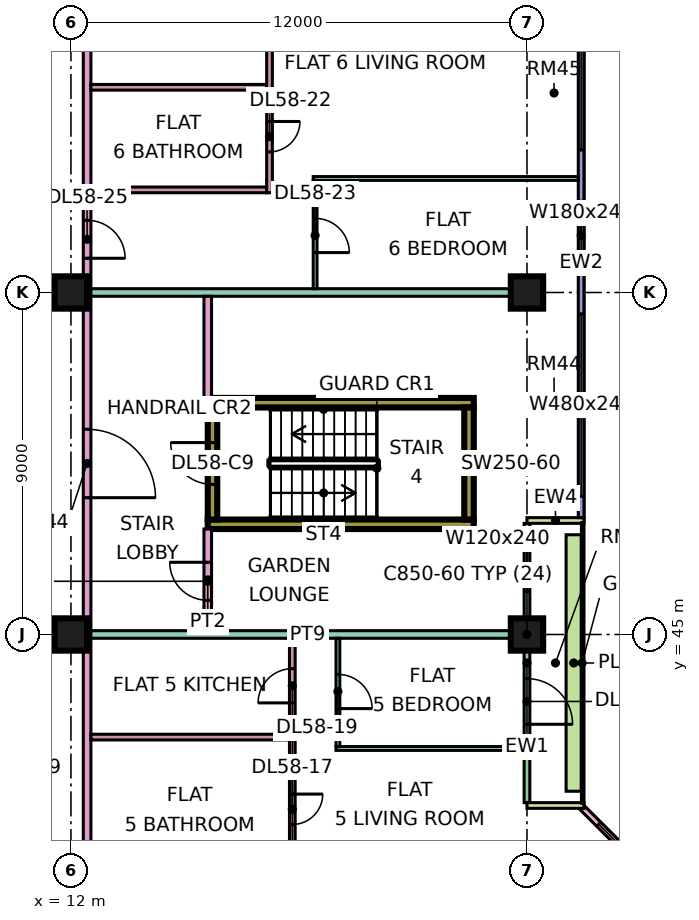
"""IFC4 building model, lengths in metres.
Left out: names, types, materials, properties, quantities, classifications, styles, units other than length and angle.
Written with IfcOpenShell. Run it as: python <this file> out.ifc"""

import sys

from ifc_helpers import new_model, si_unit, direction, frame, frame_2d, origin, origin_2d, place, context, subcontext, project, spatial, rectangle, extrude, element, fill, save


model = new_model("IFC4")
c1 = context("Model", 3, precision=1e-05, world=origin(), true_north=direction((0.0, 1.0)))
c2 = subcontext(c1, "Body", "Model", "MODEL_VIEW")
j1 = project(units=[si_unit("LENGTHUNIT", "METRE"), si_unit("PLANEANGLEUNIT", "RADIAN")], contexts=[c1])
p1 = place(None, origin())
s1 = spatial("IfcSite", under=j1, at=p1, CompositionType="ELEMENT")
p2 = place(p1, origin())
s2 = spatial("IfcBuilding", under=s1, at=p2, CompositionType="ELEMENT")
p3 = place(p2, frame((0.0, 0.0, 245.4)))
s3 = spatial("IfcBuildingStorey", under=s2, at=p3, CompositionType="ELEMENT", Elevation=245.4)
for number, where, z_axis, x_axis in (
    (1, (12.0, 45.0, 0.0), (0.0, 0.0, 1.0), (1.0, 0.0, 0.0)),
    (2, (12.0, 54.0, 0.0), (0.0, 0.0, 1.0), (1.0, 0.0, 0.0)),
    (3, (24.0, 45.0, 0.0), (0.0, 0.0, 1.0), (1.0, 0.0, 0.0)),
    (4, (24.0, 54.0, 0.0), (0.0, 0.0, 1.0), (1.0, 0.0, 0.0)),
):
    element("IfcColumn", number, at=place(p3, frame(where, z_axis=z_axis, x_axis=x_axis)), inside=s3, PredefinedType="COLUMN", context=c2, shape_type="SweptSolid", body=[
        extrude(rectangle(XDim=0.85, YDim=0.85, at=origin_2d()), origin(), (0.0, 0.0, 1.0), 3.75),
    ])
for number, where, z_axis, x_axis in (
    (5, (15.6, 47.9, 0.0), (0.0, 0.0, 1.0), (1.0, 0.0, 0.0)),
    (6, (15.6, 51.1, 0.0), (0.0, 0.0, 1.0), (1.0, 0.0, 0.0)),
):
    element("IfcWall", number, at=place(p3, frame(where, z_axis=z_axis, x_axis=x_axis)), inside=s3, PredefinedType="SHEAR", context=c2, shape_type="SweptSolid", body=[
        extrude(rectangle(XDim=7.0, YDim=0.25, at=frame_2d((3.5, 0.0))), origin(), (0.0, 0.0, 1.0), 3.75),
    ])
p4 = place(p3, frame((15.725, 48.025, 0.0), z_axis=(0.0, 0.0, 1.0), x_axis=(0.0, 1.0, 0.0)))
e7 = element("IfcWall", 7, at=p4, inside=s3, PredefinedType="SHEAR", context=c2, shape_type="SweptSolid", body=[
    extrude(rectangle(XDim=2.95, YDim=0.25, at=frame_2d((1.475, 0.0))), origin(), (0.0, 0.0, 1.0), 3.75),
])
p5 = place(p4, frame((0.925, 0.0, 0.0)))
e8 = element("IfcOpeningElement", 8, at=p5, cuts=e7, PredefinedType="OPENING", context=c2, shape_type="SweptSolid", body=[
    extrude(rectangle(XDim=1.1, YDim=2.2, at=frame_2d((0.55, 1.1))), frame((0.0, 0.135, 0.0), z_axis=(0.0, -1.0, 0.0), x_axis=(1.0, 0.0, 0.0)), (0.0, 0.0, 1.0), 0.27),
])
p6 = place(p3, frame((22.475, 48.025, 0.0), z_axis=(0.0, 0.0, 1.0), x_axis=(0.0, 1.0, 0.0)))
e9 = element("IfcWall", 9, at=p6, inside=s3, PredefinedType="SHEAR", context=c2, shape_type="SweptSolid", body=[
    extrude(rectangle(XDim=2.95, YDim=0.25, at=frame_2d((1.475, 0.0))), origin(), (0.0, 0.0, 1.0), 3.75),
])
p7 = place(p3, frame((28.447, 37.447, 0.0), z_axis=(0.0, 0.0, 1.0), x_axis=(-0.707106781187, 0.707106781187, 0.0)))
e10 = element("IfcWall", 10, at=p7, inside=s3, PredefinedType="SOLIDWALL", context=c2, shape_type="SweptSolid", body=[
    extrude(rectangle(XDim=4.243, YDim=0.15, at=frame_2d((2.121, 0.0))), origin(), (0.0, 0.0, 1.0), 3.35),
])
p8 = place(p7, frame((0.621, 0.0, 0.45)))
e11 = element("IfcOpeningElement", 11, at=p8, cuts=e10, PredefinedType="OPENING", context=c2, shape_type="SweptSolid", body=[
    extrude(rectangle(XDim=3.0, YDim=2.4, at=frame_2d((1.5, 1.2))), frame((0.0, 0.085, 0.0), z_axis=(0.0, -1.0, 0.0), x_axis=(1.0, 0.0, 0.0)), (0.0, 0.0, 1.0), 0.17),
])
p9 = place(p3, frame((24.0, 40.575, 0.0), z_axis=(0.0, 0.0, 1.0), x_axis=(0.0, 1.0, 0.0)))
e12 = element("IfcWall", 12, at=p9, inside=s3, PredefinedType="SOLIDWALL", context=c2, shape_type="SweptSolid", body=[
    extrude(rectangle(XDim=7.35, YDim=0.15, at=frame_2d((3.675, 0.0))), origin(), (0.0, 0.0, 1.0), 3.35),
])
p10 = place(p9, frame((2.062, 0.0, 0.0)))
e13 = element("IfcOpeningElement", 13, at=p10, cuts=e12, PredefinedType="OPENING", context=c2, shape_type="SweptSolid", body=[
    extrude(rectangle(XDim=1.2, YDim=2.4, at=frame_2d((0.6, 1.2))), frame((0.0, 0.085, 0.0), z_axis=(0.0, -1.0, 0.0), x_axis=(1.0, 0.0, 0.0)), (0.0, 0.0, 1.0), 0.17),
])
p11 = place(p9, frame((5.55, 0.0, 0.45)))
e14 = element("IfcOpeningElement", 14, at=p11, cuts=e12, PredefinedType="OPENING", context=c2, shape_type="SweptSolid", body=[
    extrude(rectangle(XDim=1.2, YDim=2.4, at=frame_2d((0.6, 1.2))), frame((0.0, 0.085, 0.0), z_axis=(0.0, -1.0, 0.0), x_axis=(1.0, 0.0, 0.0)), (0.0, 0.0, 1.0), 0.17),
])
for number, where, z_axis, x_axis in (
    (15, (25.5, 40.5, 0.0), (0.0, 0.0, 1.0), (-1.0, 0.0, 0.0)),
    (16, (25.5, 48.0, 0.0), (0.0, 0.0, 1.0), (-1.0, 0.0, 0.0)),
):
    element("IfcWall", number, at=place(p3, frame(where, z_axis=z_axis, x_axis=x_axis)), inside=s3, PredefinedType="SOLIDWALL", context=c2, shape_type="SweptSolid", body=[
        extrude(rectangle(XDim=1.5, YDim=0.15, at=frame_2d((0.75, 0.0))), origin(), (0.0, 0.0, 1.0), 3.35),
    ])
p12 = place(p3, frame((25.425, 48.075, 0.0), z_axis=(0.0, 0.0, 1.0), x_axis=(0.0, 1.0, 0.0)))
e17 = element("IfcWall", 17, at=p12, inside=s3, PredefinedType="SOLIDWALL", context=c2, shape_type="SweptSolid", body=[
    extrude(rectangle(XDim=13.425, YDim=0.15, at=frame_2d((6.712, 0.0))), origin(), (0.0, 0.0, 1.0), 3.35),
])
p13 = place(p12, frame((0.562, 0.0, 0.45)))
e18 = element("IfcOpeningElement", 18, at=p13, cuts=e17, PredefinedType="OPENING", context=c2, shape_type="SweptSolid", body=[
    extrude(rectangle(XDim=4.8, YDim=2.4, at=frame_2d((2.4, 1.2))), frame((0.0, 0.085, 0.0), z_axis=(0.0, -1.0, 0.0), x_axis=(1.0, 0.0, 0.0)), (0.0, 0.0, 1.0), 0.17),
])
p14 = place(p12, frame((6.525, 0.0, 0.45)))
e19 = element("IfcOpeningElement", 19, at=p14, cuts=e17, PredefinedType="OPENING", context=c2, shape_type="SweptSolid", body=[
    extrude(rectangle(XDim=1.8, YDim=2.4, at=frame_2d((0.9, 1.2))), frame((0.0, 0.085, 0.0), z_axis=(0.0, -1.0, 0.0), x_axis=(1.0, 0.0, 0.0)), (0.0, 0.0, 1.0), 0.17),
])
p15 = place(p12, frame((9.675, 0.0, 0.45)))
e20 = element("IfcOpeningElement", 20, at=p15, cuts=e17, PredefinedType="OPENING", context=c2, shape_type="SweptSolid", body=[
    extrude(rectangle(XDim=3.0, YDim=2.4, at=frame_2d((1.5, 1.2))), frame((0.0, 0.085, 0.0), z_axis=(0.0, -1.0, 0.0), x_axis=(1.0, 0.0, 0.0)), (0.0, 0.0, 1.0), 0.17),
])
p16 = place(p3, frame((25.229, 40.875, 0.0), z_axis=(0.0, 0.0, 1.0), x_axis=(0.0, 1.0, 0.0)))
e21 = element("IfcWall", 21, at=p16, inside=s3, PredefinedType="SOLIDWALL", context=c2, shape_type="SweptSolid", body=[
    extrude(rectangle(XDim=6.75, YDim=0.4, at=frame_2d((3.375, 0.0))), origin(), (0.0, 0.0, 1.0), 0.7),
])
p17 = place(p3, frame((12.425, 20.0, 0.0), z_axis=(0.0, 0.0, 1.0), x_axis=(0.0, 1.0, 0.0)))
e22 = element("IfcWall", 22, at=p17, inside=s3, PredefinedType="PARTITIONING", context=c2, shape_type="SweptSolid", body=[
    extrude(rectangle(XDim=42.926, YDim=0.2, at=frame_2d((21.463, 0.0))), origin(), (0.0, 0.0, 1.0), 3.35),
])
p18 = place(p17, frame((7.0, 0.0, 0.0)))
e23 = element("IfcOpeningElement", 23, at=p18, cuts=e22, PredefinedType="OPENING", context=c2, shape_type="SweptSolid", body=[
    extrude(rectangle(XDim=1.0, YDim=2.1, at=frame_2d((0.5, 1.05))), frame((0.0, 0.11, 0.0), z_axis=(0.0, -1.0, 0.0), x_axis=(1.0, 0.0, 0.0)), (0.0, 0.0, 1.0), 0.22),
])
p19 = place(p17, frame((12.95, 0.0, 0.0)))
e24 = element("IfcOpeningElement", 24, at=p19, cuts=e22, PredefinedType="OPENING", context=c2, shape_type="SweptSolid", body=[
    extrude(rectangle(XDim=1.0, YDim=2.1, at=frame_2d((0.5, 1.05))), frame((0.0, 0.11, 0.0), z_axis=(0.0, -1.0, 0.0), x_axis=(1.0, 0.0, 0.0)), (0.0, 0.0, 1.0), 0.22),
])
p20 = place(p17, frame((16.75, 0.0, 0.0)))
e25 = element("IfcOpeningElement", 25, at=p20, cuts=e22, PredefinedType="OPENING", context=c2, shape_type="SweptSolid", body=[
    extrude(rectangle(XDim=1.0, YDim=2.1, at=frame_2d((0.5, 1.05))), frame((0.0, 0.11, 0.0), z_axis=(0.0, -1.0, 0.0), x_axis=(1.0, 0.0, 0.0)), (0.0, 0.0, 1.0), 0.22),
])
p21 = place(p17, frame((34.9, 0.0, 0.0)))
e26 = element("IfcOpeningElement", 26, at=p21, cuts=e22, PredefinedType="OPENING", context=c2, shape_type="SweptSolid", body=[
    extrude(rectangle(XDim=1.0, YDim=2.1, at=frame_2d((0.5, 1.05))), frame((0.0, 0.11, 0.0), z_axis=(0.0, -1.0, 0.0), x_axis=(1.0, 0.0, 0.0)), (0.0, 0.0, 1.0), 0.22),
])
p22 = place(p17, frame((1.15, 0.0, 0.0)))
e27 = element("IfcOpeningElement", 27, at=p22, cuts=e22, PredefinedType="OPENING", context=c2, shape_type="SweptSolid", body=[
    extrude(rectangle(XDim=1.8, YDim=2.1, at=frame_2d((0.9, 1.05))), frame((0.0, 0.11, 0.0), z_axis=(0.0, -1.0, 0.0), x_axis=(1.0, 0.0, 0.0)), (0.0, 0.0, 1.0), 0.22),
])
p23 = place(p17, frame((28.6, 0.0, 0.0)))
e28 = element("IfcOpeningElement", 28, at=p23, cuts=e22, PredefinedType="OPENING", context=c2, shape_type="SweptSolid", body=[
    extrude(rectangle(XDim=1.8, YDim=2.1, at=frame_2d((0.9, 1.05))), frame((0.0, 0.11, 0.0), z_axis=(0.0, -1.0, 0.0), x_axis=(1.0, 0.0, 0.0)), (0.0, 0.0, 1.0), 0.22),
])
p24 = place(p3, frame((12.525, 42.3, 0.0), z_axis=(0.0, 0.0, 1.0), x_axis=(1.0, 0.0, 0.0)))
e29 = element("IfcWall", 29, at=p24, inside=s3, PredefinedType="PARTITIONING", context=c2, shape_type="SweptSolid", body=[
    extrude(rectangle(XDim=5.225, YDim=0.15, at=frame_2d((2.613, 0.0))), origin(), (0.0, 0.0, 1.0), 3.35),
])
p25 = place(p3, frame((12.525, 45.0, 0.0), z_axis=(0.0, 0.0, 1.0), x_axis=(1.0, 0.0, 0.0)))
e30 = element("IfcWall", 30, at=p25, inside=s3, PredefinedType="PARTITIONING", context=c2, shape_type="SweptSolid", body=[
    extrude(rectangle(XDim=11.401, YDim=0.2, at=frame_2d((5.701, 0.0))), origin(), (0.0, 0.0, 1.0), 3.35),
])
p26 = place(p3, frame((12.525, 54.0, 0.0), z_axis=(0.0, 0.0, 1.0), x_axis=(1.0, 0.0, 0.0)))
e31 = element("IfcWall", 31, at=p26, inside=s3, PredefinedType="PARTITIONING", context=c2, shape_type="SweptSolid", body=[
    extrude(rectangle(XDim=11.475, YDim=0.2, at=frame_2d((5.738, 0.0))), origin(), (0.0, 0.0, 1.0), 3.35),
])
for number, where, z_axis, x_axis in (
    (32, (12.525, 56.7, 0.0), (0.0, 0.0, 1.0), (1.0, 0.0, 0.0)),
    (33, (12.525, 59.4, 0.0), (0.0, 0.0, 1.0), (1.0, 0.0, 0.0)),
):
    element("IfcWall", number, at=place(p3, frame(where, z_axis=z_axis, x_axis=x_axis)), inside=s3, PredefinedType="PARTITIONING", context=c2, shape_type="SweptSolid", body=[
        extrude(rectangle(XDim=4.625, YDim=0.15, at=frame_2d((2.312, 0.0))), origin(), (0.0, 0.0, 1.0), 3.35),
    ])
p27 = place(p3, frame((15.6, 45.1, 0.0), z_axis=(0.0, 0.0, 1.0), x_axis=(0.0, 1.0, 0.0)))
e34 = element("IfcWall", 34, at=p27, inside=s3, PredefinedType="PARTITIONING", context=c2, shape_type="SweptSolid", body=[
    extrude(rectangle(XDim=2.675, YDim=0.2, at=frame_2d((1.337, 0.0))), origin(), (0.0, 0.0, 1.0), 3.35),
])
p28 = place(p27, frame((0.8, 0.0, 0.0)))
e35 = element("IfcOpeningElement", 35, at=p28, cuts=e34, PredefinedType="OPENING", context=c2, shape_type="SweptSolid", body=[
    extrude(rectangle(XDim=1.0, YDim=2.1, at=frame_2d((0.5, 1.05))), frame((0.0, 0.11, 0.0), z_axis=(0.0, -1.0, 0.0), x_axis=(1.0, 0.0, 0.0)), (0.0, 0.0, 1.0), 0.22),
])
p29 = place(p3, frame((15.6, 51.225, 0.0), z_axis=(0.0, 0.0, 1.0), x_axis=(0.0, 1.0, 0.0)))
e36 = element("IfcWall", 36, at=p29, inside=s3, PredefinedType="PARTITIONING", context=c2, shape_type="SweptSolid", body=[
    extrude(rectangle(XDim=2.675, YDim=0.2, at=frame_2d((1.337, 0.0))), origin(), (0.0, 0.0, 1.0), 3.35),
])
p30 = place(p3, frame((17.225, 56.625, 0.0), z_axis=(0.0, 0.0, 1.0), x_axis=(0.0, 1.0, 0.0)))
e37 = element("IfcWall", 37, at=p30, inside=s3, PredefinedType="PARTITIONING", context=c2, shape_type="SweptSolid", body=[
    extrude(rectangle(XDim=6.301, YDim=0.15, at=frame_2d((3.15, 0.0))), origin(), (0.0, 0.0, 1.0), 3.35),
])
p31 = place(p30, frame((1.075, 0.0, 0.0)))
e38 = element("IfcOpeningElement", 38, at=p31, cuts=e37, PredefinedType="OPENING", context=c2, shape_type="SweptSolid", body=[
    extrude(rectangle(XDim=0.8, YDim=2.1, at=frame_2d((0.4, 1.05))), frame((0.0, 0.085, 0.0), z_axis=(0.0, -1.0, 0.0), x_axis=(1.0, 0.0, 0.0)), (0.0, 0.0, 1.0), 0.17),
])
p32 = place(p30, frame((4.125, 0.0, 0.0)))
e39 = element("IfcOpeningElement", 39, at=p32, cuts=e37, PredefinedType="OPENING", context=c2, shape_type="SweptSolid", body=[
    extrude(rectangle(XDim=0.9, YDim=2.1, at=frame_2d((0.45, 1.05))), frame((0.0, 0.085, 0.0), z_axis=(0.0, -1.0, 0.0), x_axis=(1.0, 0.0, 0.0)), (0.0, 0.0, 1.0), 0.17),
])
p33 = place(p3, frame((17.825, 38.325, 0.0), z_axis=(0.0, 0.0, 1.0), x_axis=(0.0, 1.0, 0.0)))
e40 = element("IfcWall", 40, at=p33, inside=s3, PredefinedType="PARTITIONING", context=c2, shape_type="SweptSolid", body=[
    extrude(rectangle(XDim=6.575, YDim=0.15, at=frame_2d((3.288, 0.0))), origin(), (0.0, 0.0, 1.0), 3.35),
])
p34 = place(p33, frame((1.675, 0.0, 0.0)))
e41 = element("IfcOpeningElement", 41, at=p34, cuts=e40, PredefinedType="OPENING", context=c2, shape_type="SweptSolid", body=[
    extrude(rectangle(XDim=0.8, YDim=2.1, at=frame_2d((0.4, 1.05))), frame((0.0, 0.085, 0.0), z_axis=(0.0, -1.0, 0.0), x_axis=(1.0, 0.0, 0.0)), (0.0, 0.0, 1.0), 0.17),
])
p35 = place(p33, frame((4.875, 0.0, 0.0)))
e42 = element("IfcOpeningElement", 42, at=p35, cuts=e40, PredefinedType="OPENING", context=c2, shape_type="SweptSolid", body=[
    extrude(rectangle(XDim=0.9, YDim=2.1, at=frame_2d((0.45, 1.05))), frame((0.0, 0.085, 0.0), z_axis=(0.0, -1.0, 0.0), x_axis=(1.0, 0.0, 0.0)), (0.0, 0.0, 1.0), 0.17),
])
p36 = place(p3, frame((18.375, 57.0, 0.0), z_axis=(0.0, 0.0, 1.0), x_axis=(1.0, 0.0, 0.0)))
e43 = element("IfcWall", 43, at=p36, inside=s3, PredefinedType="PARTITIONING", context=c2, shape_type="SweptSolid", body=[
    extrude(rectangle(XDim=6.975, YDim=0.1, at=frame_2d((3.488, 0.0))), origin(), (0.0, 0.0, 1.0), 3.35),
])
p37 = place(p3, frame((18.425, 54.1, 0.0), z_axis=(0.0, 0.0, 1.0), x_axis=(0.0, 1.0, 0.0)))
e44 = element("IfcWall", 44, at=p37, inside=s3, PredefinedType="PARTITIONING", context=c2, shape_type="SweptSolid", body=[
    extrude(rectangle(XDim=2.85, YDim=0.1, at=frame_2d((1.425, 0.0))), origin(), (0.0, 0.0, 1.0), 3.35),
])
p38 = place(p37, frame((0.95, 0.0, 0.0)))
e45 = element("IfcOpeningElement", 45, at=p38, cuts=e44, PredefinedType="OPENING", context=c2, shape_type="SweptSolid", body=[
    extrude(rectangle(XDim=0.9, YDim=2.1, at=frame_2d((0.45, 1.05))), frame((0.0, 0.06, 0.0), z_axis=(0.0, -1.0, 0.0), x_axis=(1.0, 0.0, 0.0)), (0.0, 0.0, 1.0), 0.12),
])
p39 = place(p3, frame((18.975, 42.0, 0.0), z_axis=(0.0, 0.0, 1.0), x_axis=(1.0, 0.0, 0.0)))
e46 = element("IfcWall", 46, at=p39, inside=s3, PredefinedType="PARTITIONING", context=c2, shape_type="SweptSolid", body=[
    extrude(rectangle(XDim=4.951, YDim=0.1, at=frame_2d((2.476, 0.0))), origin(), (0.0, 0.0, 1.0), 3.35),
])
p40 = place(p3, frame((19.025, 42.05, 0.0), z_axis=(0.0, 0.0, 1.0), x_axis=(0.0, 1.0, 0.0)))
e47 = element("IfcWall", 47, at=p40, inside=s3, PredefinedType="PARTITIONING", context=c2, shape_type="SweptSolid", body=[
    extrude(rectangle(XDim=2.85, YDim=0.1, at=frame_2d((1.425, 0.0))), origin(), (0.0, 0.0, 1.0), 3.35),
])
p41 = place(p40, frame((1.0, 0.0, 0.0)))
e48 = element("IfcOpeningElement", 48, at=p41, cuts=e47, PredefinedType="OPENING", context=c2, shape_type="SweptSolid", body=[
    extrude(rectangle(XDim=0.9, YDim=2.1, at=frame_2d((0.45, 1.05))), frame((0.0, 0.06, 0.0), z_axis=(0.0, -1.0, 0.0), x_axis=(1.0, 0.0, 0.0)), (0.0, 0.0, 1.0), 0.12),
])
p42 = place(p8, origin())
e49 = element("IfcWindow", 49, at=p42, inside=s3, PartitioningType="SINGLE_PANEL", PredefinedType="WINDOW", context=c2, shape_type="SweptSolid", body=[
    extrude(rectangle(XDim=3.0, YDim=2.4, at=frame_2d((1.5, 1.2))), frame((0.0, 0.03, 0.0), z_axis=(0.0, -1.0, 0.0), x_axis=(1.0, 0.0, 0.0)), (0.0, 0.0, 1.0), 0.06),
])
fill(e11, e49)
p43 = place(p10, frame((1.2, 0.0, 0.0), z_axis=(0.0, 0.0, 1.0), x_axis=(-1.0, 0.0, 0.0)))
e50 = element("IfcDoor", 50, at=p43, inside=s3, OperationType="DOUBLE_DOOR_SINGLE_SWING", PredefinedType="DOOR", context=c2, shape_type="SweptSolid", body=[
    extrude(rectangle(XDim=1.2, YDim=2.4, at=frame_2d((0.6, 1.2))), frame((0.0, 0.025, 0.0), z_axis=(0.0, -1.0, 0.0), x_axis=(1.0, 0.0, 0.0)), (0.0, 0.0, 1.0), 0.05),
])
fill(e13, e50)
p44 = place(p11, origin())
e51 = element("IfcWindow", 51, at=p44, inside=s3, PartitioningType="SINGLE_PANEL", PredefinedType="WINDOW", context=c2, shape_type="SweptSolid", body=[
    extrude(rectangle(XDim=1.2, YDim=2.4, at=frame_2d((0.6, 1.2))), frame((0.0, 0.03, 0.0), z_axis=(0.0, -1.0, 0.0), x_axis=(1.0, 0.0, 0.0)), (0.0, 0.0, 1.0), 0.06),
])
fill(e14, e51)
p45 = place(p13, origin())
e52 = element("IfcWindow", 52, at=p45, inside=s3, PartitioningType="SINGLE_PANEL", PredefinedType="WINDOW", context=c2, shape_type="SweptSolid", body=[
    extrude(rectangle(XDim=4.8, YDim=2.4, at=frame_2d((2.4, 1.2))), frame((0.0, 0.03, 0.0), z_axis=(0.0, -1.0, 0.0), x_axis=(1.0, 0.0, 0.0)), (0.0, 0.0, 1.0), 0.06),
])
fill(e18, e52)
p46 = place(p14, origin())
e53 = element("IfcWindow", 53, at=p46, inside=s3, PartitioningType="SINGLE_PANEL", PredefinedType="WINDOW", context=c2, shape_type="SweptSolid", body=[
    extrude(rectangle(XDim=1.8, YDim=2.4, at=frame_2d((0.9, 1.2))), frame((0.0, 0.03, 0.0), z_axis=(0.0, -1.0, 0.0), x_axis=(1.0, 0.0, 0.0)), (0.0, 0.0, 1.0), 0.06),
])
fill(e19, e53)
p47 = place(p15, origin())
e54 = element("IfcWindow", 54, at=p47, inside=s3, PartitioningType="SINGLE_PANEL", PredefinedType="WINDOW", context=c2, shape_type="SweptSolid", body=[
    extrude(rectangle(XDim=3.0, YDim=2.4, at=frame_2d((1.5, 1.2))), frame((0.0, 0.03, 0.0), z_axis=(0.0, -1.0, 0.0), x_axis=(1.0, 0.0, 0.0)), (0.0, 0.0, 1.0), 0.06),
])
fill(e20, e54)
p48 = place(p5, frame((1.1, 0.0, 0.0), z_axis=(0.0, 0.0, 1.0), x_axis=(-1.0, 0.0, 0.0)))
e55 = element("IfcDoor", 55, at=p48, inside=s3, OperationType="SINGLE_SWING_RIGHT", PredefinedType="DOOR", context=c2, shape_type="SweptSolid", body=[
    extrude(rectangle(XDim=1.1, YDim=2.2, at=frame_2d((0.55, 1.1))), frame((0.0, 0.025, 0.0), z_axis=(0.0, -1.0, 0.0), x_axis=(1.0, 0.0, 0.0)), (0.0, 0.0, 1.0), 0.05),
])
fill(e8, e55)
p49 = place(p34, origin())
e56 = element("IfcDoor", 56, at=p49, inside=s3, OperationType="SINGLE_SWING_RIGHT", PredefinedType="DOOR", context=c2, shape_type="SweptSolid", body=[
    extrude(rectangle(XDim=0.8, YDim=2.1, at=frame_2d((0.4, 1.05))), frame((0.0, 0.025, 0.0), z_axis=(0.0, -1.0, 0.0), x_axis=(1.0, 0.0, 0.0)), (0.0, 0.0, 1.0), 0.05),
])
fill(e41, e56)
p50 = place(p41, frame((0.9, 0.0, 0.0), z_axis=(0.0, 0.0, 1.0), x_axis=(-1.0, 0.0, 0.0)))
e57 = element("IfcDoor", 57, at=p50, inside=s3, OperationType="SINGLE_SWING_LEFT", PredefinedType="DOOR", context=c2, shape_type="SweptSolid", body=[
    extrude(rectangle(XDim=0.9, YDim=2.1, at=frame_2d((0.45, 1.05))), frame((0.0, 0.025, 0.0), z_axis=(0.0, -1.0, 0.0), x_axis=(1.0, 0.0, 0.0)), (0.0, 0.0, 1.0), 0.05),
])
fill(e48, e57)
p51 = place(p35, origin())
e58 = element("IfcDoor", 58, at=p51, inside=s3, OperationType="SINGLE_SWING_LEFT", PredefinedType="DOOR", context=c2, shape_type="SweptSolid", body=[
    extrude(rectangle(XDim=0.9, YDim=2.1, at=frame_2d((0.45, 1.05))), frame((0.0, 0.025, 0.0), z_axis=(0.0, -1.0, 0.0), x_axis=(1.0, 0.0, 0.0)), (0.0, 0.0, 1.0), 0.05),
])
fill(e42, e58)
p52 = place(p31, origin())
e59 = element("IfcDoor", 59, at=p52, inside=s3, OperationType="SINGLE_SWING_RIGHT", PredefinedType="DOOR", context=c2, shape_type="SweptSolid", body=[
    extrude(rectangle(XDim=0.8, YDim=2.1, at=frame_2d((0.4, 1.05))), frame((0.0, 0.025, 0.0), z_axis=(0.0, -1.0, 0.0), x_axis=(1.0, 0.0, 0.0)), (0.0, 0.0, 1.0), 0.05),
])
fill(e38, e59)
p53 = place(p38, frame((0.9, 0.0, 0.0), z_axis=(0.0, 0.0, 1.0), x_axis=(-1.0, 0.0, 0.0)))
e60 = element("IfcDoor", 60, at=p53, inside=s3, OperationType="SINGLE_SWING_LEFT", PredefinedType="DOOR", context=c2, shape_type="SweptSolid", body=[
    extrude(rectangle(XDim=0.9, YDim=2.1, at=frame_2d((0.45, 1.05))), frame((0.0, 0.025, 0.0), z_axis=(0.0, -1.0, 0.0), x_axis=(1.0, 0.0, 0.0)), (0.0, 0.0, 1.0), 0.05),
])
fill(e45, e60)
p54 = place(p21, frame((1.0, 0.0, 0.0), z_axis=(0.0, 0.0, 1.0), x_axis=(-1.0, 0.0, 0.0)))
e61 = element("IfcDoor", 61, at=p54, inside=s3, OperationType="SINGLE_SWING_LEFT", PredefinedType="DOOR", context=c2, shape_type="SweptSolid", body=[
    extrude(rectangle(XDim=1.0, YDim=2.1, at=frame_2d((0.5, 1.05))), frame((0.0, 0.025, 0.0), z_axis=(0.0, -1.0, 0.0), x_axis=(1.0, 0.0, 0.0)), (0.0, 0.0, 1.0), 0.05),
])
fill(e26, e61)
p55 = place(p23, frame((1.8, 0.0, 0.0), z_axis=(0.0, 0.0, 1.0), x_axis=(-1.0, 0.0, 0.0)))
e62 = element("IfcDoor", 62, at=p55, inside=s3, OperationType="DOUBLE_DOOR_SINGLE_SWING", PredefinedType="DOOR", context=c2, shape_type="SweptSolid", body=[
    extrude(rectangle(XDim=1.8, YDim=2.1, at=frame_2d((0.9, 1.05))), frame((0.0, 0.025, 0.0), z_axis=(0.0, -1.0, 0.0), x_axis=(1.0, 0.0, 0.0)), (0.0, 0.0, 1.0), 0.05),
])
fill(e28, e62)
p56 = place(p28, frame((1.0, 0.0, 0.0), z_axis=(0.0, 0.0, 1.0), x_axis=(-1.0, 0.0, 0.0)))
e63 = element("IfcDoor", 63, at=p56, inside=s3, OperationType="SINGLE_SWING_RIGHT", PredefinedType="DOOR", context=c2, shape_type="SweptSolid", body=[
    extrude(rectangle(XDim=1.0, YDim=2.1, at=frame_2d((0.5, 1.05))), frame((0.0, 0.025, 0.0), z_axis=(0.0, -1.0, 0.0), x_axis=(1.0, 0.0, 0.0)), (0.0, 0.0, 1.0), 0.05),
])
fill(e35, e63)
save(model, sys.argv[1])
